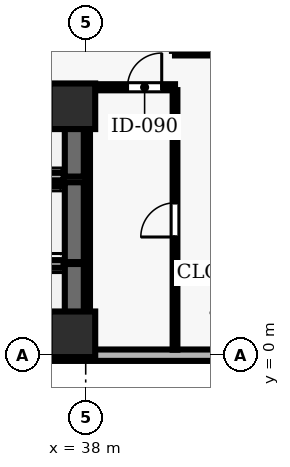
"""IFC4 building model, lengths in metres.
Left out: names, types, materials, properties, quantities, classifications, styles, units other than length and angle.
Written with IfcOpenShell. Run it as: python <this file> out.ifc"""

import sys

from ifc_helpers import new_model, si_unit, direction, frame, frame_2d, origin, origin_2d, place, context, subcontext, project, spatial, rectangle, extrude, element, fill, save


model = new_model("IFC4")
c1 = context("Model", 3, precision=1e-05, world=origin(), true_north=direction((0.0, 1.0)))
c2 = subcontext(c1, "Body", "Model", "MODEL_VIEW")
j1 = project(units=[si_unit("LENGTHUNIT", "METRE"), si_unit("PLANEANGLEUNIT", "RADIAN")], contexts=[c1])
p1 = place(None, origin())
s1 = spatial("IfcSite", under=j1, at=p1, CompositionType="ELEMENT")
p2 = place(p1, origin())
s2 = spatial("IfcBuilding", under=s1, at=p2, CompositionType="ELEMENT")
p3 = place(p2, frame((0.0, 0.0, 146.3)))
s3 = spatial("IfcBuildingStorey", under=s2, at=p3, CompositionType="ELEMENT", Elevation=146.3)
for number, where, z_axis, x_axis in (
    (1, (37.65, 0.55, 0.0), (0.0, 0.0, 1.0), (1.0, 0.0, 0.0)),
    (2, (37.65, 6.55, 0.0), (0.0, 0.0, 1.0), (1.0, 0.0, 0.0)),
):
    element("IfcColumn", number, at=place(p3, frame(where, z_axis=z_axis, x_axis=x_axis)), inside=s3, PredefinedType="COLUMN", context=c2, shape_type="SweptSolid", body=[
        extrude(rectangle(XDim=1.2, YDim=1.2, at=origin_2d()), origin(), (0.0, 0.0, 1.0), 3.9),
    ])
p4 = place(p3, frame((24.5, 0.0, 0.0), z_axis=(0.0, 0.0, 1.0), x_axis=(1.0, 0.0, 0.0)))
e3 = element("IfcWall", 3, at=p4, inside=s3, PredefinedType="SOLIDWALL", context=c2, shape_type="SweptSolid", body=[
    extrude(rectangle(XDim=43.6, YDim=0.3, at=frame_2d((21.8, 0.0))), origin(), (0.0, 0.0, 1.0), 3.69),
])
p5 = place(p4, frame((1.225, 0.0, 0.9)))
e4 = element("IfcOpeningElement", 4, at=p5, cuts=e3, PredefinedType="OPENING", context=c2, shape_type="SweptSolid", body=[
    extrude(rectangle(XDim=3.0, YDim=2.2, at=frame_2d((1.5, 1.1))), frame((0.0, 0.16, 0.0), z_axis=(0.0, -1.0, 0.0), x_axis=(1.0, 0.0, 0.0)), (0.0, 0.0, 1.0), 0.32),
])
p6 = place(p4, frame((17.575, 0.0, 0.9)))
e5 = element("IfcOpeningElement", 5, at=p6, cuts=e3, PredefinedType="OPENING", context=c2, shape_type="SweptSolid", body=[
    extrude(rectangle(XDim=3.0, YDim=2.2, at=frame_2d((1.5, 1.1))), frame((0.0, 0.16, 0.0), z_axis=(0.0, -1.0, 0.0), x_axis=(1.0, 0.0, 0.0)), (0.0, 0.0, 1.0), 0.32),
])
p7 = place(p4, frame((23.025, 0.0, 0.9)))
e6 = element("IfcOpeningElement", 6, at=p7, cuts=e3, PredefinedType="OPENING", context=c2, shape_type="SweptSolid", body=[
    extrude(rectangle(XDim=3.0, YDim=2.2, at=frame_2d((1.5, 1.1))), frame((0.0, 0.16, 0.0), z_axis=(0.0, -1.0, 0.0), x_axis=(1.0, 0.0, 0.0)), (0.0, 0.0, 1.0), 0.32),
])
p8 = place(p4, frame((28.475, 0.0, 0.9)))
e7 = element("IfcOpeningElement", 7, at=p8, cuts=e3, PredefinedType="OPENING", context=c2, shape_type="SweptSolid", body=[
    extrude(rectangle(XDim=3.0, YDim=2.2, at=frame_2d((1.5, 1.1))), frame((0.0, 0.16, 0.0), z_axis=(0.0, -1.0, 0.0), x_axis=(1.0, 0.0, 0.0)), (0.0, 0.0, 1.0), 0.32),
])
p9 = place(p4, frame((39.375, 0.0, 0.9)))
e8 = element("IfcOpeningElement", 8, at=p9, cuts=e3, PredefinedType="OPENING", context=c2, shape_type="SweptSolid", body=[
    extrude(rectangle(XDim=3.0, YDim=2.2, at=frame_2d((1.5, 1.1))), frame((0.0, 0.16, 0.0), z_axis=(0.0, -1.0, 0.0), x_axis=(1.0, 0.0, 0.0)), (0.0, 0.0, 1.0), 0.32),
])
p10 = place(p3, frame((37.7, 0.3, 0.0), z_axis=(0.0, 0.0, 1.0), x_axis=(0.0, 1.0, 0.0)))
e9 = element("IfcWall", 9, at=p10, inside=s3, PredefinedType="SHEAR", context=c2, shape_type="SweptSolid", body=[
    extrude(rectangle(XDim=2.1, YDim=0.5, at=frame_2d((1.05, 0.0))), origin(), (0.0, 0.0, 1.0), 3.69),
])
for number, where, z_axis, x_axis in (
    (10, (35.28, 0.3, 0.0), (0.0, 0.0, 1.0), (1.0, 0.0, 0.0)),
    (11, (37.42, 2.4, 0.0), (0.0, 0.0, 1.0), (-1.0, 0.0, 0.0)),
):
    element("IfcWall", number, at=place(p3, frame(where, z_axis=z_axis, x_axis=x_axis)), inside=s3, PredefinedType="SOLIDWALL", context=c2, shape_type="SweptSolid", body=[
        extrude(rectangle(XDim=2.14, YDim=0.2, at=frame_2d((1.07, 0.0))), origin(), (0.0, 0.0, 1.0), 3.69),
    ])
p11 = place(p3, frame((37.7, 2.45, 0.0), z_axis=(0.0, 0.0, 1.0), x_axis=(0.0, 1.0, 0.0)))
e12 = element("IfcWall", 12, at=p11, inside=s3, PredefinedType="SHEAR", context=c2, shape_type="SweptSolid", body=[
    extrude(rectangle(XDim=2.1, YDim=0.5, at=frame_2d((1.05, 0.0))), origin(), (0.0, 0.0, 1.0), 3.69),
])
p12 = place(p3, frame((37.42, 4.55, 0.0), z_axis=(0.0, 0.0, 1.0), x_axis=(-1.0, 0.0, 0.0)))
e13 = element("IfcWall", 13, at=p12, inside=s3, PredefinedType="SOLIDWALL", context=c2, shape_type="SweptSolid", body=[
    extrude(rectangle(XDim=2.14, YDim=0.2, at=frame_2d((1.07, 0.0))), origin(), (0.0, 0.0, 1.0), 3.69),
])
p13 = place(p3, frame((37.7, 4.7, 0.0), z_axis=(0.0, 0.0, 1.0), x_axis=(0.0, 1.0, 0.0)))
e14 = element("IfcWall", 14, at=p13, inside=s3, PredefinedType="SHEAR", context=c2, shape_type="SweptSolid", body=[
    extrude(rectangle(XDim=2.25, YDim=0.5, at=frame_2d((1.125, 0.0))), origin(), (0.0, 0.0, 1.0), 3.69),
])
for number, where, z_axis, x_axis in (
    (15, (35.28, 4.7, 0.0), (0.0, 0.0, 1.0), (1.0, 0.0, 0.0)),
    (16, (37.42, 6.95, 0.0), (0.0, 0.0, 1.0), (-1.0, 0.0, 0.0)),
):
    element("IfcWall", number, at=place(p3, frame(where, z_axis=z_axis, x_axis=x_axis)), inside=s3, PredefinedType="SOLIDWALL", context=c2, shape_type="SweptSolid", body=[
        extrude(rectangle(XDim=2.14, YDim=0.2, at=frame_2d((1.07, 0.0))), origin(), (0.0, 0.0, 1.0), 3.69),
    ])
p14 = place(p3, frame((38.05, 7.05, 0.0), z_axis=(0.0, 0.0, 1.0), x_axis=(1.0, 0.0, 0.0)))
e17 = element("IfcWall", 17, at=p14, inside=s3, PredefinedType="PARTITIONING", context=c2, shape_type="SweptSolid", body=[
    extrude(rectangle(XDim=2.3, YDim=0.16, at=frame_2d((1.15, 0.0))), origin(), (0.0, 0.0, 1.0), 3.69),
])
p15 = place(p14, frame((1.05, 0.0, 0.0)))
e18 = element("IfcOpeningElement", 18, at=p15, cuts=e17, PredefinedType="OPENING", context=c2, shape_type="SweptSolid", body=[
    extrude(rectangle(XDim=0.9, YDim=2.1, at=frame_2d((0.45, 1.05))), frame((0.0, 0.09, 0.0), z_axis=(0.0, -1.0, 0.0), x_axis=(1.0, 0.0, 0.0)), (0.0, 0.0, 1.0), 0.18),
])
p16 = place(p3, frame((52.0, 7.95, 0.0), z_axis=(0.0, 0.0, 1.0), x_axis=(-1.0, 0.0, 0.0)))
e19 = element("IfcWall", 19, at=p16, inside=s3, PredefinedType="PARTITIONING", context=c2, shape_type="SweptSolid", body=[
    extrude(rectangle(XDim=11.65, YDim=0.125, at=frame_2d((5.825, 0.0))), origin(), (0.0, 0.0, 1.0), 3.073),
])
p17 = place(p3, frame((38.05, 6.975, 0.0), z_axis=(0.0, 0.0, 1.0), x_axis=(0.0, -1.0, 0.0)))
e20 = element("IfcWall", 20, at=p17, inside=s3, PredefinedType="PARTITIONING", context=c2, shape_type="SweptSolid", body=[
    extrude(rectangle(XDim=6.83, YDim=0.125, at=frame_2d((3.415, 0.0))), origin(), (0.0, 0.0, 1.0), 3.073),
])
p18 = place(p3, frame((40.35, 0.145, 0.0), z_axis=(0.0, 0.0, 1.0), x_axis=(0.0, 1.0, 0.0)))
e21 = element("IfcWall", 21, at=p18, inside=s3, PredefinedType="PARTITIONING", context=c2, shape_type="SweptSolid", body=[
    extrude(rectangle(XDim=6.83, YDim=0.125, at=frame_2d((3.415, 0.0))), origin(), (0.0, 0.0, 1.0), 3.69),
])
p19 = place(p18, frame((2.965, 0.0, 0.0)))
e22 = element("IfcOpeningElement", 22, at=p19, cuts=e21, PredefinedType="OPENING", context=c2, shape_type="SweptSolid", body=[
    extrude(rectangle(XDim=0.9, YDim=2.1, at=frame_2d((0.45, 1.05))), frame((0.0, 0.073, 0.0), z_axis=(0.0, -1.0, 0.0), x_axis=(1.0, 0.0, 0.0)), (0.0, 0.0, 1.0), 0.145),
])
p20 = place(p15, origin())
e23 = element("IfcDoor", 23, at=p20, inside=s3, OperationType="SINGLE_SWING_RIGHT", PredefinedType="DOOR", context=c2, shape_type="SweptSolid", body=[
    extrude(rectangle(XDim=0.9, YDim=2.1, at=frame_2d((0.45, 1.05))), frame((0.0, 0.025, 0.0), z_axis=(0.0, -1.0, 0.0), x_axis=(1.0, 0.0, 0.0)), (0.0, 0.0, 1.0), 0.05),
])
fill(e18, e23)
p21 = place(p19, origin())
e24 = element("IfcDoor", 24, at=p21, inside=s3, OperationType="SINGLE_SWING_LEFT", PredefinedType="DOOR", context=c2, shape_type="SweptSolid", body=[
    extrude(rectangle(XDim=0.9, YDim=2.1, at=frame_2d((0.45, 1.05))), frame((0.0, 0.025, 0.0), z_axis=(0.0, -1.0, 0.0), x_axis=(1.0, 0.0, 0.0)), (0.0, 0.0, 1.0), 0.05),
])
fill(e22, e24)
save(model, sys.argv[1])
